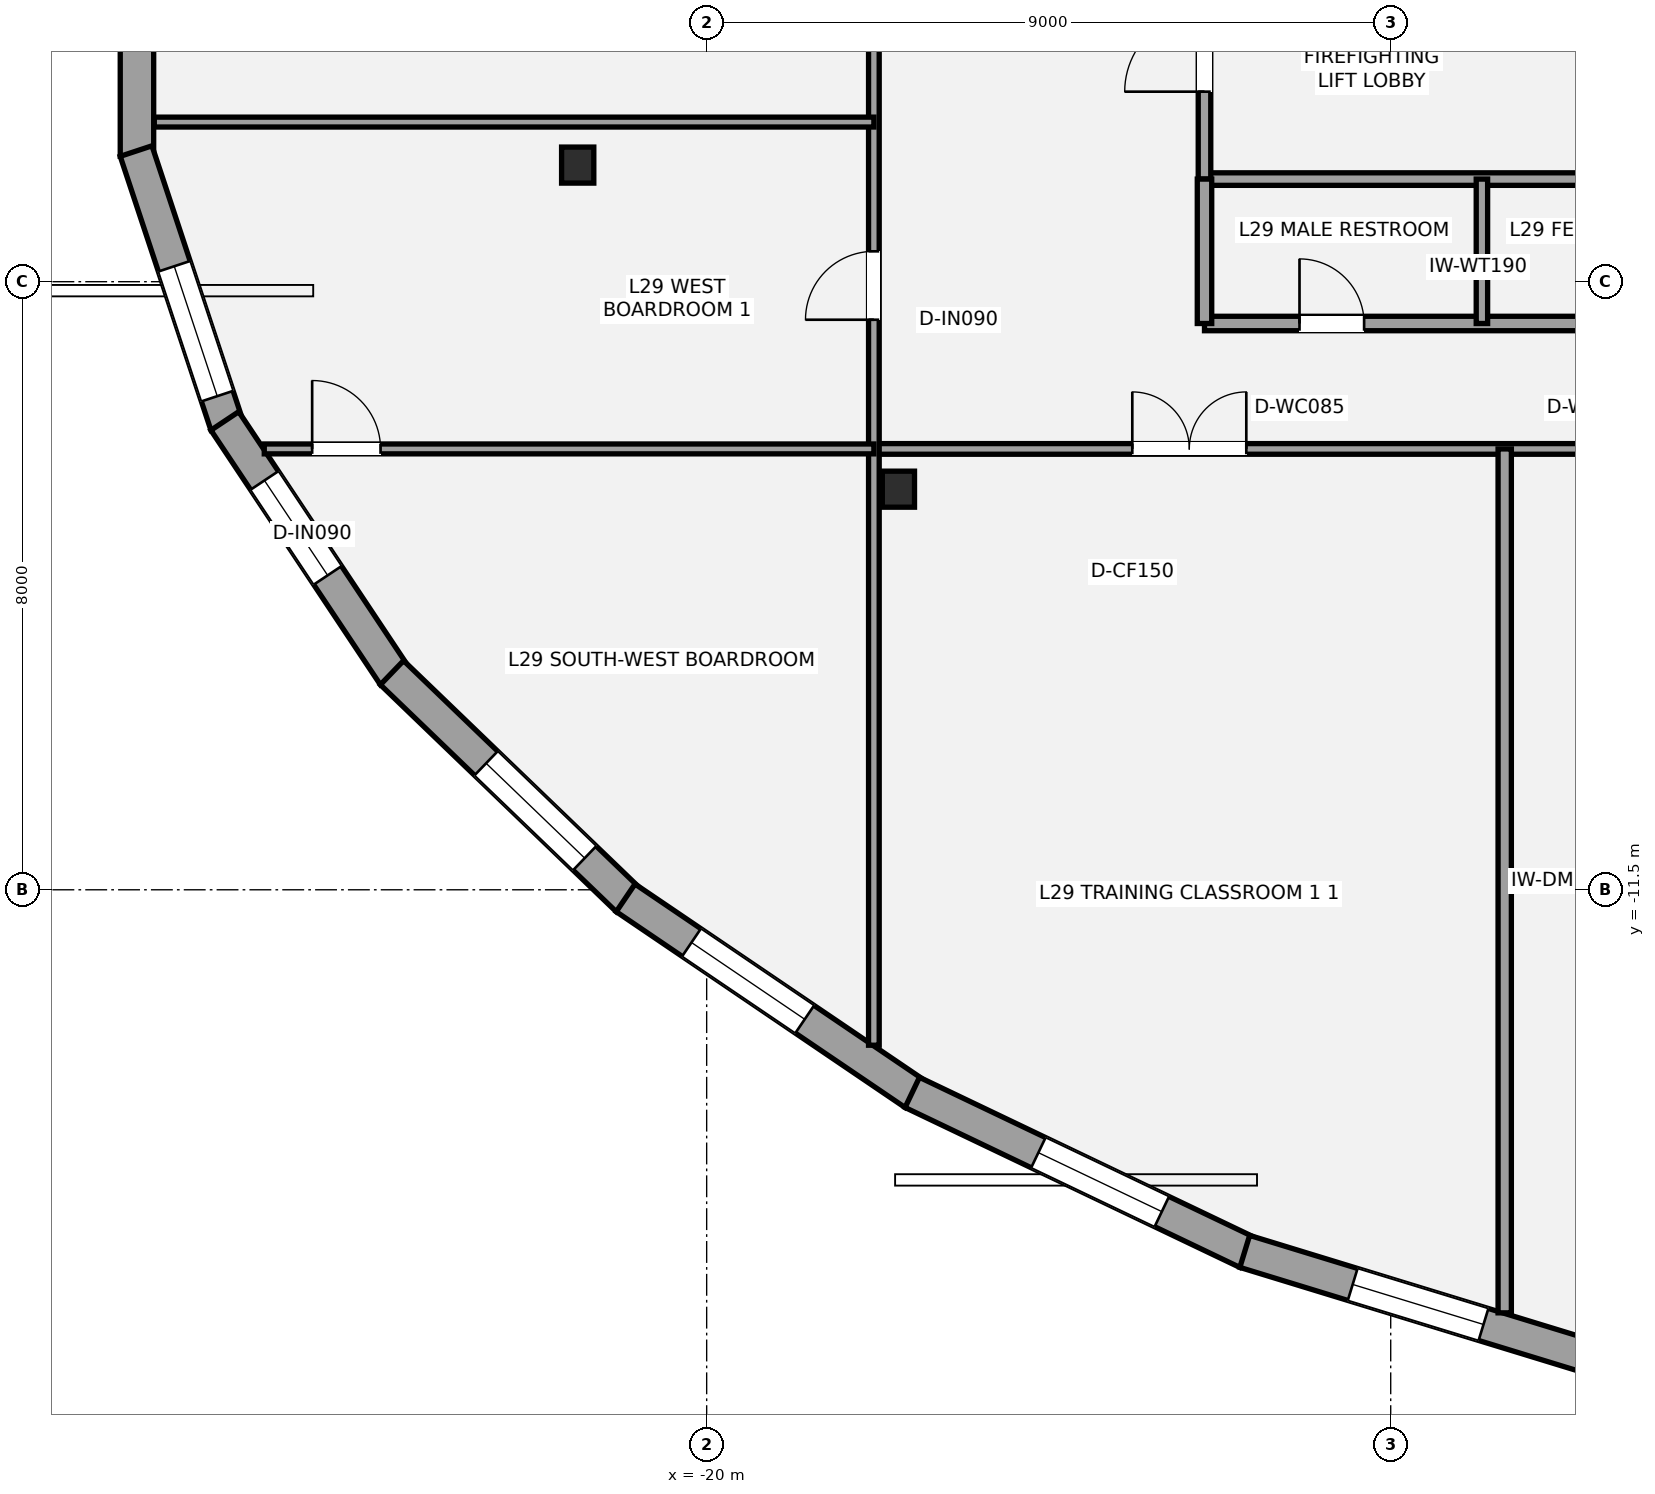
"""IFC4 building model, lengths in metres.
Left out: names, types, materials, properties, quantities, classifications, styles, units other than length and angle.
Written with IfcOpenShell. Run it as: python <this file> out.ifc"""

import sys

from ifc_helpers import new_model, si_unit, direction, frame, frame_2d, origin, origin_2d, place, context, subcontext, project, spatial, rectangle, i_section, extrude, element, fill, save


model = new_model("IFC4")
c1 = context("Model", 3, precision=1e-05, world=origin(), true_north=direction((0.0, 1.0)))
c2 = subcontext(c1, "Body", "Model", "MODEL_VIEW")
j1 = project(units=[si_unit("LENGTHUNIT", "METRE"), si_unit("PLANEANGLEUNIT", "RADIAN")], contexts=[c1])
p1 = place(None, origin())
s1 = spatial("IfcSite", under=j1, at=p1, CompositionType="ELEMENT")
p2 = place(p1, origin())
s2 = spatial("IfcBuilding", under=s1, at=p2, CompositionType="ELEMENT")
p3 = place(p2, frame((0.0, 0.0, 110.6)))
s3 = spatial("IfcBuildingStorey", under=s2, at=p3, CompositionType="ELEMENT", Elevation=110.6)
for number, where, z_axis, x_axis in (
    (1, (-21.697, -1.966, 0.0), (0.0, 0.0, 1.0), (1.0, 0.0, 0.0)),
    (2, (-17.477, -6.229, 0.0), (0.0, 0.0, 1.0), (1.0, 0.0, 0.0)),
):
    element("IfcColumn", number, at=place(p3, frame(where, z_axis=z_axis, x_axis=x_axis)), inside=s3, PredefinedType="COLUMN", context=c2, shape_type="SweptSolid", body=[
        extrude(i_section(OverallWidth=0.424, OverallDepth=0.474, WebThickness=0.048, FlangeThickness=0.077, at=origin_2d()), origin(), (0.0, 0.0, 1.0), 3.5),
    ])
p4 = place(p3, frame((-27.496, -1.851, 0.0), z_axis=(0.0, 0.0, 1.0), x_axis=(0.0, 1.0, 0.0)))
e3 = element("IfcWall", 3, at=p4, inside=s3, PredefinedType="STANDARD", context=c2, shape_type="SweptSolid", body=[
    extrude(rectangle(XDim=3.701, YDim=0.44, at=frame_2d((1.851, 0.0))), origin(), (0.0, 0.0, 1.0), 2.532),
])
p5 = place(p4, frame((1.556, 0.0, 0.65)))
e4 = element("IfcOpeningElement", 4, at=p5, cuts=e3, PredefinedType="OPENING", context=c2, shape_type="SweptSolid", body=[
    extrude(rectangle(XDim=1.8, YDim=1.7, at=frame_2d((0.9, 0.85))), frame((0.0, 0.23, 0.0), z_axis=(0.0, -1.0, 0.0), x_axis=(1.0, 0.0, 0.0)), (0.0, 0.0, 1.0), 0.46),
])
p6 = place(p3, frame((-26.314, -5.385, 0.0), z_axis=(0.0, 0.0, 1.0), x_axis=(-0.314316911692, 0.94931811266, 0.0)))
e5 = element("IfcWall", 5, at=p6, inside=s3, PredefinedType="STANDARD", context=c2, shape_type="SweptSolid", body=[
    extrude(rectangle(XDim=3.796, YDim=0.44, at=frame_2d((1.898, 0.0))), origin(), (0.0, 0.0, 1.0), 2.532),
])
p7 = place(p6, frame((0.399, 0.0, 0.65)))
e6 = element("IfcOpeningElement", 6, at=p7, cuts=e5, PredefinedType="OPENING", context=c2, shape_type="SweptSolid", body=[
    extrude(rectangle(XDim=1.8, YDim=1.7, at=frame_2d((0.9, 0.85))), frame((0.0, 0.23, 0.0), z_axis=(0.0, -1.0, 0.0), x_axis=(1.0, 0.0, 0.0)), (0.0, 0.0, 1.0), 0.46),
])
p8 = place(p3, frame((-24.11, -8.68, 0.0), z_axis=(0.0, 0.0, 1.0), x_axis=(-0.554293965046, 0.83232097193, 0.0)))
e7 = element("IfcWall", 7, at=p8, inside=s3, PredefinedType="STANDARD", context=c2, shape_type="SweptSolid", body=[
    extrude(rectangle(XDim=4.023, YDim=0.44, at=frame_2d((2.011, 0.0))), origin(), (0.0, 0.0, 1.0), 2.528),
])
p9 = place(p8, frame((1.582, 0.0, 0.65)))
e8 = element("IfcOpeningElement", 8, at=p9, cuts=e7, PredefinedType="OPENING", context=c2, shape_type="SweptSolid", body=[
    extrude(rectangle(XDim=1.5, YDim=1.7, at=frame_2d((0.75, 0.85))), frame((0.0, 0.23, 0.0), z_axis=(0.0, -1.0, 0.0), x_axis=(1.0, 0.0, 0.0)), (0.0, 0.0, 1.0), 0.46),
])
p10 = place(p3, frame((-21.037, -11.63, 0.0), z_axis=(0.0, 0.0, 1.0), x_axis=(-0.720581378362, 0.693370375166, 0.0)))
e9 = element("IfcWall", 9, at=p10, inside=s3, PredefinedType="STANDARD", context=c2, shape_type="SweptSolid", body=[
    extrude(rectangle(XDim=4.307, YDim=0.44, at=frame_2d((2.153, 0.0))), origin(), (0.0, 0.0, 1.0), 2.528),
])
p11 = place(p10, frame((0.788, 0.0, 0.65)))
e10 = element("IfcOpeningElement", 10, at=p11, cuts=e9, PredefinedType="OPENING", context=c2, shape_type="SweptSolid", body=[
    extrude(rectangle(XDim=1.8, YDim=1.7, at=frame_2d((0.9, 0.85))), frame((0.0, 0.23, 0.0), z_axis=(0.0, -1.0, 0.0), x_axis=(1.0, 0.0, 0.0)), (0.0, 0.0, 1.0), 0.46),
])
p12 = place(p3, frame((-17.266, -14.182, 0.0), z_axis=(0.0, 0.0, 1.0), x_axis=(-0.827754551165, 0.56109036975, 0.0)))
e11 = element("IfcWall", 11, at=p12, inside=s3, PredefinedType="STANDARD", context=c2, shape_type="SweptSolid", body=[
    extrude(rectangle(XDim=4.591, YDim=0.44, at=frame_2d((2.295, 0.0))), origin(), (0.0, 0.0, 1.0), 2.528),
])
p13 = place(p12, frame((1.744, 0.0, 0.65)))
e12 = element("IfcOpeningElement", 12, at=p13, cuts=e11, PredefinedType="OPENING", context=c2, shape_type="SweptSolid", body=[
    extrude(rectangle(XDim=1.8, YDim=1.7, at=frame_2d((0.9, 0.85))), frame((0.0, 0.23, 0.0), z_axis=(0.0, -1.0, 0.0), x_axis=(1.0, 0.0, 0.0)), (0.0, 0.0, 1.0), 0.46),
])
p14 = place(p3, frame((-12.89, -16.27, 0.0), z_axis=(0.0, 0.0, 1.0), x_axis=(-0.902372757907, 0.430956385018, 0.0)))
e13 = element("IfcWall", 13, at=p14, inside=s3, PredefinedType="STANDARD", context=c2, shape_type="SweptSolid", body=[
    extrude(rectangle(XDim=4.882, YDim=0.44, at=frame_2d((2.441, 0.0))), origin(), (0.0, 0.0, 1.0), 2.528),
])
p15 = place(p14, frame((1.243, 0.0, 0.65)))
e14 = element("IfcOpeningElement", 14, at=p15, cuts=e13, PredefinedType="OPENING", context=c2, shape_type="SweptSolid", body=[
    extrude(rectangle(XDim=1.8, YDim=1.7, at=frame_2d((0.9, 0.85))), frame((0.0, 0.23, 0.0), z_axis=(0.0, -1.0, 0.0), x_axis=(1.0, 0.0, 0.0)), (0.0, 0.0, 1.0), 0.46),
])
p16 = place(p3, frame((-7.981, -17.769, 0.0), z_axis=(0.0, 0.0, 1.0), x_axis=(-0.956228569431, 0.292620783617, 0.0)))
e15 = element("IfcWall", 15, at=p16, inside=s3, PredefinedType="STANDARD", context=c2, shape_type="SweptSolid", body=[
    extrude(rectangle(XDim=5.165, YDim=0.44, at=frame_2d((2.583, 0.0))), origin(), (0.0, 0.0, 1.0), 2.528),
])
p17 = place(p16, frame((1.88, 0.0, 0.65)))
e16 = element("IfcOpeningElement", 16, at=p17, cuts=e15, PredefinedType="OPENING", context=c2, shape_type="SweptSolid", body=[
    extrude(rectangle(XDim=1.8, YDim=1.7, at=frame_2d((0.9, 0.85))), frame((0.0, 0.23, 0.0), z_axis=(0.0, -1.0, 0.0), x_axis=(1.0, 0.0, 0.0)), (0.0, 0.0, 1.0), 0.46),
])
p18 = place(p3, frame((-13.45, -2.15, 0.0), z_axis=(0.0, 0.0, 1.0), x_axis=(1.0, 0.0, 0.0)))
e17 = element("IfcWall", 17, at=p18, inside=s3, PredefinedType="PARTITIONING", context=c2, shape_type="SweptSolid", body=[
    extrude(rectangle(XDim=6.25, YDim=0.165, at=frame_2d((3.125, 0.0))), origin(), (0.0, 0.0, 1.0), 3.31),
])
p19 = place(p3, frame((-13.45, -2.15, 0.0), z_axis=(0.0, 0.0, 1.0), x_axis=(0.0, 1.0, 0.0)))
e18 = element("IfcWall", 18, at=p19, inside=s3, PredefinedType="PARTITIONING", context=c2, shape_type="SweptSolid", body=[
    extrude(rectangle(XDim=3.3, YDim=0.165, at=frame_2d((1.65, 0.0))), origin(), (0.0, 0.0, 1.0), 2.763),
])
p20 = place(p19, frame((1.15, 0.0, 0.0)))
e19 = element("IfcOpeningElement", 19, at=p20, cuts=e18, PredefinedType="OPENING", context=c2, shape_type="SweptSolid", body=[
    extrude(rectangle(XDim=1.05, YDim=2.15, at=frame_2d((0.525, 1.075))), frame((0.0, 0.093, 0.0), z_axis=(0.0, -1.0, 0.0), x_axis=(1.0, 0.0, 0.0)), (0.0, 0.0, 1.0), 0.185),
])
p21 = place(p3, frame((-13.45, -4.05, 0.0), z_axis=(0.0, 0.0, 1.0), x_axis=(1.0, 0.0, 0.0)))
e20 = element("IfcWall", 20, at=p21, inside=s3, PredefinedType="PLUMBINGWALL", context=c2, shape_type="SweptSolid", body=[
    extrude(rectangle(XDim=11.35, YDim=0.19, at=frame_2d((5.675, 0.0))), origin(), (0.0, 0.0, 1.0), 2.763),
])
p22 = place(p21, frame((1.25, 0.0, 0.0)))
e21 = element("IfcOpeningElement", 21, at=p22, cuts=e20, PredefinedType="OPENING", context=c2, shape_type="SweptSolid", body=[
    extrude(rectangle(XDim=0.85, YDim=2.1, at=frame_2d((0.425, 1.05))), frame((0.0, 0.105, 0.0), z_axis=(0.0, -1.0, 0.0), x_axis=(1.0, 0.0, 0.0)), (0.0, 0.0, 1.0), 0.21),
])
p23 = place(p21, frame((5.1, 0.0, 0.0)))
e22 = element("IfcOpeningElement", 22, at=p23, cuts=e20, PredefinedType="OPENING", context=c2, shape_type="SweptSolid", body=[
    extrude(rectangle(XDim=0.85, YDim=2.1, at=frame_2d((0.425, 1.05))), frame((0.0, 0.105, 0.0), z_axis=(0.0, -1.0, 0.0), x_axis=(1.0, 0.0, 0.0)), (0.0, 0.0, 1.0), 0.21),
])
p24 = place(p21, frame((8.95, 0.0, 0.0)))
e23 = element("IfcOpeningElement", 23, at=p24, cuts=e20, PredefinedType="OPENING", context=c2, shape_type="SweptSolid", body=[
    extrude(rectangle(XDim=0.95, YDim=2.15, at=frame_2d((0.475, 1.075))), frame((0.0, 0.105, 0.0), z_axis=(0.0, -1.0, 0.0), x_axis=(1.0, 0.0, 0.0)), (0.0, 0.0, 1.0), 0.21),
])
p25 = place(p3, frame((-13.45, -4.05, 0.0), z_axis=(0.0, 0.0, 1.0), x_axis=(0.0, 1.0, 0.0)))
e24 = element("IfcWall", 24, at=p25, inside=s3, PredefinedType="PLUMBINGWALL", context=c2, shape_type="SweptSolid", body=[
    extrude(rectangle(XDim=1.9, YDim=0.19, at=frame_2d((0.95, 0.0))), origin(), (0.0, 0.0, 1.0), 2.763),
])
p26 = place(p3, frame((-9.8, -4.05, 0.0), z_axis=(0.0, 0.0, 1.0), x_axis=(0.0, 1.0, 0.0)))
e25 = element("IfcWall", 25, at=p26, inside=s3, PredefinedType="PLUMBINGWALL", context=c2, shape_type="SweptSolid", body=[
    extrude(rectangle(XDim=1.9, YDim=0.15, at=frame_2d((0.95, 0.0))), origin(), (0.0, 0.0, 1.0), 3.31),
])
p27 = place(p3, frame((-17.8, -5.7, 0.0), z_axis=(0.0, 0.0, 1.0), x_axis=(1.0, 0.0, 0.0)))
e26 = element("IfcWall", 26, at=p27, inside=s3, PredefinedType="PARTITIONING", context=c2, shape_type="SweptSolid", body=[
    extrude(rectangle(XDim=34.2, YDim=0.14, at=frame_2d((17.1, 0.0))), origin(), (0.0, 0.0, 1.0), 2.688),
])
p28 = place(p27, frame((3.4, 0.0, 0.0)))
e27 = element("IfcOpeningElement", 27, at=p28, cuts=e26, PredefinedType="OPENING", context=c2, shape_type="SweptSolid", body=[
    extrude(rectangle(XDim=1.5, YDim=2.15, at=frame_2d((0.75, 1.075))), frame((0.0, 0.08, 0.0), z_axis=(0.0, -1.0, 0.0), x_axis=(1.0, 0.0, 0.0)), (0.0, 0.0, 1.0), 0.16),
])
p29 = place(p27, frame((11.55, 0.0, 0.0)))
e28 = element("IfcOpeningElement", 28, at=p29, cuts=e26, PredefinedType="OPENING", context=c2, shape_type="SweptSolid", body=[
    extrude(rectangle(XDim=1.5, YDim=2.15, at=frame_2d((0.75, 1.075))), frame((0.0, 0.08, 0.0), z_axis=(0.0, -1.0, 0.0), x_axis=(1.0, 0.0, 0.0)), (0.0, 0.0, 1.0), 0.16),
])
p30 = place(p27, frame((19.55, 0.0, 0.0)))
e29 = element("IfcOpeningElement", 29, at=p30, cuts=e26, PredefinedType="OPENING", context=c2, shape_type="SweptSolid", body=[
    extrude(rectangle(XDim=1.5, YDim=2.15, at=frame_2d((0.75, 1.075))), frame((0.0, 0.08, 0.0), z_axis=(0.0, -1.0, 0.0), x_axis=(1.0, 0.0, 0.0)), (0.0, 0.0, 1.0), 0.16),
])
p31 = place(p27, frame((28.5, 0.0, 0.0)))
e30 = element("IfcOpeningElement", 30, at=p31, cuts=e26, PredefinedType="OPENING", context=c2, shape_type="SweptSolid", body=[
    extrude(rectangle(XDim=1.5, YDim=2.15, at=frame_2d((0.75, 1.075))), frame((0.0, 0.08, 0.0), z_axis=(0.0, -1.0, 0.0), x_axis=(1.0, 0.0, 0.0)), (0.0, 0.0, 1.0), 0.16),
])
p32 = place(p3, frame((-17.8, -13.545, 0.0), z_axis=(0.0, 0.0, 1.0), x_axis=(0.0, 1.0, 0.0)))
e31 = element("IfcWall", 31, at=p32, inside=s3, PredefinedType="PARTITIONING", context=c2, shape_type="SweptSolid", body=[
    extrude(rectangle(XDim=21.095, YDim=0.14, at=frame_2d((10.547, 0.0))), origin(), (0.0, 0.0, 1.0), 2.688),
])
p33 = place(p32, frame((9.545, 0.0, 0.0)))
e32 = element("IfcOpeningElement", 32, at=p33, cuts=e31, PredefinedType="OPENING", context=c2, shape_type="SweptSolid", body=[
    extrude(rectangle(XDim=0.9, YDim=2.1, at=frame_2d((0.45, 1.05))), frame((0.0, 0.08, 0.0), z_axis=(0.0, -1.0, 0.0), x_axis=(1.0, 0.0, 0.0)), (0.0, 0.0, 1.0), 0.16),
])
p34 = place(p32, frame((13.995, 0.0, 0.0)))
e33 = element("IfcOpeningElement", 33, at=p34, cuts=e31, PredefinedType="OPENING", context=c2, shape_type="SweptSolid", body=[
    extrude(rectangle(XDim=0.9, YDim=2.1, at=frame_2d((0.45, 1.05))), frame((0.0, 0.08, 0.0), z_axis=(0.0, -1.0, 0.0), x_axis=(1.0, 0.0, 0.0)), (0.0, 0.0, 1.0), 0.16),
])
p35 = place(p32, frame((18.469, 0.0, 0.0)))
e34 = element("IfcOpeningElement", 34, at=p35, cuts=e31, PredefinedType="OPENING", context=c2, shape_type="SweptSolid", body=[
    extrude(rectangle(XDim=0.9, YDim=2.1, at=frame_2d((0.45, 1.05))), frame((0.0, 0.08, 0.0), z_axis=(0.0, -1.0, 0.0), x_axis=(1.0, 0.0, 0.0)), (0.0, 0.0, 1.0), 0.16),
])
p36 = place(p3, frame((-9.5, -17.066, 0.0), z_axis=(0.0, 0.0, 1.0), x_axis=(0.0, 1.0, 0.0)))
e35 = element("IfcWall", 35, at=p36, inside=s3, PredefinedType="PARTITIONING", context=c2, shape_type="SweptSolid", body=[
    extrude(rectangle(XDim=11.366, YDim=0.175, at=frame_2d((5.683, 0.0))), origin(), (0.0, 0.0, 1.0), 2.763),
])
p37 = place(p3, frame((-25.821, -5.7, 0.0), z_axis=(0.0, 0.0, 1.0), x_axis=(1.0, 0.0, 0.0)))
e36 = element("IfcWall", 36, at=p37, inside=s3, PredefinedType="PARTITIONING", context=c2, shape_type="SweptSolid", body=[
    extrude(rectangle(XDim=8.021, YDim=0.13, at=frame_2d((4.01, 0.0))), origin(), (0.0, 0.0, 1.0), 2.688),
])
p38 = place(p37, frame((0.63, 0.0, 0.0)))
e37 = element("IfcOpeningElement", 37, at=p38, cuts=e36, PredefinedType="OPENING", context=c2, shape_type="SweptSolid", body=[
    extrude(rectangle(XDim=0.9, YDim=2.1, at=frame_2d((0.45, 1.05))), frame((0.0, 0.075, 0.0), z_axis=(0.0, -1.0, 0.0), x_axis=(1.0, 0.0, 0.0)), (0.0, 0.0, 1.0), 0.15),
])
p39 = place(p3, frame((-27.268, -1.4, 0.0), z_axis=(0.0, 0.0, 1.0), x_axis=(1.0, 0.0, 0.0)))
e38 = element("IfcWall", 38, at=p39, inside=s3, PredefinedType="PARTITIONING", context=c2, shape_type="SweptSolid", body=[
    extrude(rectangle(XDim=9.468, YDim=0.13, at=frame_2d((4.734, 0.0))), origin(), (0.0, 0.0, 1.0), 2.763),
])
p40 = place(p7, origin())
e39 = element("IfcWindow", 39, at=p40, inside=s3, PartitioningType="SINGLE_PANEL", PredefinedType="WINDOW", context=c2, shape_type="SweptSolid", body=[
    extrude(rectangle(XDim=1.8, YDim=1.7, at=frame_2d((0.9, 0.85))), frame((0.0, -0.01, 0.0), z_axis=(0.0, -1.0, 0.0), x_axis=(1.0, 0.0, 0.0)), (0.0, 0.0, 1.0), 0.06),
])
fill(e6, e39)
p41 = place(p9, origin())
e40 = element("IfcWindow", 40, at=p41, inside=s3, PartitioningType="SINGLE_PANEL", PredefinedType="WINDOW", context=c2, shape_type="SweptSolid", body=[
    extrude(rectangle(XDim=1.5, YDim=1.7, at=frame_2d((0.75, 0.85))), frame((0.0, -0.01, 0.0), z_axis=(0.0, -1.0, 0.0), x_axis=(1.0, 0.0, 0.0)), (0.0, 0.0, 1.0), 0.06),
])
fill(e8, e40)
p42 = place(p11, origin())
e41 = element("IfcWindow", 41, at=p42, inside=s3, PartitioningType="SINGLE_PANEL", PredefinedType="WINDOW", context=c2, shape_type="SweptSolid", body=[
    extrude(rectangle(XDim=1.8, YDim=1.7, at=frame_2d((0.9, 0.85))), frame((0.0, -0.01, 0.0), z_axis=(0.0, -1.0, 0.0), x_axis=(1.0, 0.0, 0.0)), (0.0, 0.0, 1.0), 0.06),
])
fill(e10, e41)
p43 = place(p13, origin())
e42 = element("IfcWindow", 42, at=p43, inside=s3, PartitioningType="SINGLE_PANEL", PredefinedType="WINDOW", context=c2, shape_type="SweptSolid", body=[
    extrude(rectangle(XDim=1.8, YDim=1.7, at=frame_2d((0.9, 0.85))), frame((0.0, -0.01, 0.0), z_axis=(0.0, -1.0, 0.0), x_axis=(1.0, 0.0, 0.0)), (0.0, 0.0, 1.0), 0.06),
])
fill(e12, e42)
p44 = place(p15, origin())
e43 = element("IfcWindow", 43, at=p44, inside=s3, PartitioningType="SINGLE_PANEL", PredefinedType="WINDOW", context=c2, shape_type="SweptSolid", body=[
    extrude(rectangle(XDim=1.8, YDim=1.7, at=frame_2d((0.9, 0.85))), frame((0.0, -0.01, 0.0), z_axis=(0.0, -1.0, 0.0), x_axis=(1.0, 0.0, 0.0)), (0.0, 0.0, 1.0), 0.06),
])
fill(e14, e43)
p45 = place(p17, origin())
e44 = element("IfcWindow", 44, at=p45, inside=s3, PartitioningType="SINGLE_PANEL", PredefinedType="WINDOW", context=c2, shape_type="SweptSolid", body=[
    extrude(rectangle(XDim=1.8, YDim=1.7, at=frame_2d((0.9, 0.85))), frame((0.0, -0.01, 0.0), z_axis=(0.0, -1.0, 0.0), x_axis=(1.0, 0.0, 0.0)), (0.0, 0.0, 1.0), 0.06),
])
fill(e16, e44)
p46 = place(p20, origin())
e45 = element("IfcDoor", 45, at=p46, inside=s3, OperationType="SINGLE_SWING_LEFT", PredefinedType="DOOR", context=c2, shape_type="SweptSolid", body=[
    extrude(rectangle(XDim=1.05, YDim=2.15, at=frame_2d((0.525, 1.075))), frame((0.0, 0.025, 0.0), z_axis=(0.0, -1.0, 0.0), x_axis=(1.0, 0.0, 0.0)), (0.0, 0.0, 1.0), 0.05),
])
fill(e19, e45)
p47 = place(p22, origin())
e46 = element("IfcDoor", 46, at=p47, inside=s3, OperationType="SINGLE_SWING_LEFT", PredefinedType="DOOR", context=c2, shape_type="SweptSolid", body=[
    extrude(rectangle(XDim=0.85, YDim=2.1, at=frame_2d((0.425, 1.05))), frame((0.0, 0.025, 0.0), z_axis=(0.0, -1.0, 0.0), x_axis=(1.0, 0.0, 0.0)), (0.0, 0.0, 1.0), 0.05),
])
fill(e21, e46)
p48 = place(p28, origin())
e47 = element("IfcDoor", 47, at=p48, inside=s3, OperationType="DOUBLE_DOOR_SINGLE_SWING", PredefinedType="DOOR", context=c2, shape_type="SweptSolid", body=[
    extrude(rectangle(XDim=1.5, YDim=2.15, at=frame_2d((0.75, 1.075))), frame((0.0, 0.025, 0.0), z_axis=(0.0, -1.0, 0.0), x_axis=(1.0, 0.0, 0.0)), (0.0, 0.0, 1.0), 0.05),
])
fill(e27, e47)
p49 = place(p38, origin())
e48 = element("IfcDoor", 48, at=p49, inside=s3, OperationType="SINGLE_SWING_LEFT", PredefinedType="DOOR", context=c2, shape_type="SweptSolid", body=[
    extrude(rectangle(XDim=0.9, YDim=2.1, at=frame_2d((0.45, 1.05))), frame((0.0, 0.025, 0.0), z_axis=(0.0, -1.0, 0.0), x_axis=(1.0, 0.0, 0.0)), (0.0, 0.0, 1.0), 0.05),
])
fill(e37, e48)
p50 = place(p33, origin())
e49 = element("IfcDoor", 49, at=p50, inside=s3, OperationType="SINGLE_SWING_LEFT", PredefinedType="DOOR", context=c2, shape_type="SweptSolid", body=[
    extrude(rectangle(XDim=0.9, YDim=2.1, at=frame_2d((0.45, 1.05))), frame((0.0, 0.025, 0.0), z_axis=(0.0, -1.0, 0.0), x_axis=(1.0, 0.0, 0.0)), (0.0, 0.0, 1.0), 0.05),
])
fill(e32, e49)
save(model, sys.argv[1])
